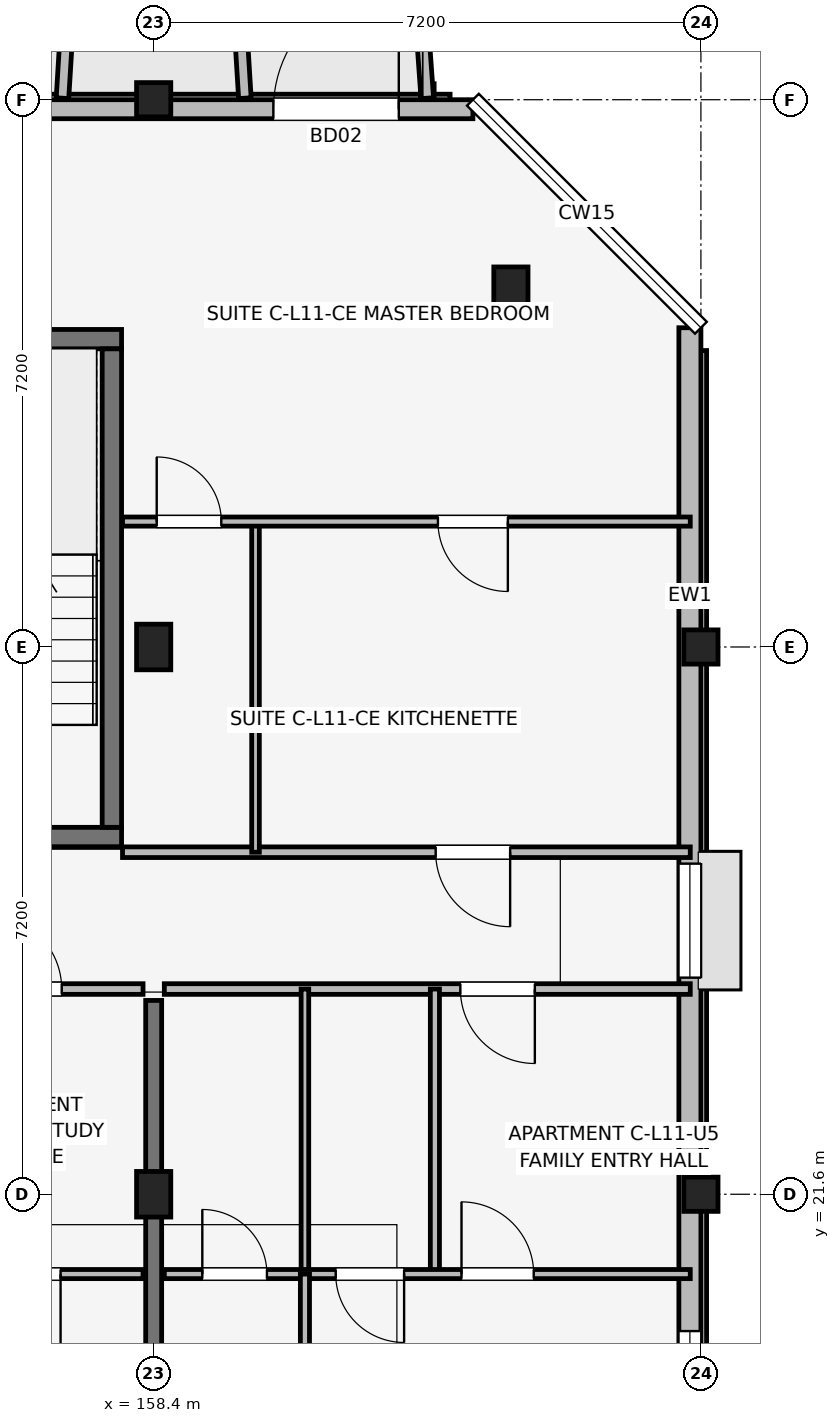
"""IFC4 building model, lengths in metres.
Left out: names, types, materials, properties, quantities, classifications, styles, units other than length and angle.
Written with IfcOpenShell. Run it as: python <this file> out.ifc"""

import sys

from ifc_helpers import new_model, si_unit, direction, frame, frame_2d, origin, origin_2d, place, context, subcontext, project, spatial, rectangle, extrude, element, fill, save


model = new_model("IFC4")
c1 = context("Model", 3, precision=1e-05, world=origin(), true_north=direction((0.0, 1.0)))
c2 = subcontext(c1, "Body", "Model", "MODEL_VIEW")
j1 = project(units=[si_unit("LENGTHUNIT", "METRE"), si_unit("PLANEANGLEUNIT", "RADIAN")], contexts=[c1])
p1 = place(None, origin())
s1 = spatial("IfcSite", under=j1, at=p1, CompositionType="ELEMENT")
p2 = place(p1, origin())
s2 = spatial("IfcBuilding", under=s1, at=p2, CompositionType="ELEMENT")
p3 = place(p2, frame((0.0, 0.0, 37.05)))
s3 = spatial("IfcBuildingStorey", under=s2, at=p3, CompositionType="ELEMENT", Elevation=37.05)
for number, where, z_axis, x_axis in (
    (1, (158.4, 21.6, 0.0), (0.0, 0.0, 1.0), (1.0, 0.0, 0.0)),
    (2, (158.4, 28.8, 0.0), (0.0, 0.0, 1.0), (1.0, 0.0, 0.0)),
):
    element("IfcColumn", number, at=place(p3, frame(where, z_axis=z_axis, x_axis=x_axis)), inside=s3, PredefinedType="COLUMN", context=c2, shape_type="SweptSolid", body=[
        extrude(rectangle(XDim=0.45, YDim=0.6, at=origin_2d()), origin(), (0.0, 0.0, 1.0), 3.15),
    ])
for number, where, z_axis, x_axis in (
    (3, (158.4, 36.0, 0.0), (0.0, 0.0, 1.0), (1.0, 0.0, 0.0)),
    (4, (165.6, 21.6, 0.0), (0.0, 0.0, 1.0), (1.0, 0.0, 0.0)),
    (5, (165.6, 28.8, 0.0), (0.0, 0.0, 1.0), (1.0, 0.0, 0.0)),
):
    element("IfcColumn", number, at=place(p3, frame(where, z_axis=z_axis, x_axis=x_axis)), inside=s3, PredefinedType="COLUMN", context=c2, shape_type="SweptSolid", body=[
        extrude(rectangle(XDim=0.45, YDim=0.45, at=origin_2d()), origin(), (0.0, 0.0, 1.0), 3.15),
    ])
p4 = place(p3, frame((163.1, 33.5, 0.0), z_axis=(0.0, 0.0, 1.0), x_axis=(1.0, 0.0, 0.0)))
e6 = element("IfcColumn", 6, at=p4, inside=s3, PredefinedType="COLUMN", context=c2, shape_type="SweptSolid", body=[
    extrude(rectangle(XDim=0.45, YDim=0.6, at=origin_2d()), origin(), (0.0, 0.0, 1.0), 3.15),
])
p5 = place(p3, frame((154.673, 26.3, 0.0), z_axis=(0.0, 0.0, 1.0), x_axis=(1.0, 0.0, 0.0)))
e7 = element("IfcWall", 7, at=p5, inside=s3, PredefinedType="SHEAR", context=c2, shape_type="SweptSolid", body=[
    extrude(rectangle(XDim=3.305, YDim=0.255, at=frame_2d((1.652, 0.0))), origin(), (0.0, 0.0, 1.0), 3.15),
])
p6 = place(p5, frame((1.127, 0.0, 0.0)))
e8 = element("IfcOpeningElement", 8, at=p6, cuts=e7, PredefinedType="OPENING", context=c2, shape_type="SweptSolid", body=[
    extrude(rectangle(XDim=1.05, YDim=2.12, at=frame_2d((0.525, 1.06))), frame((0.0, 0.137, 0.0), z_axis=(0.0, -1.0, 0.0), x_axis=(1.0, 0.0, 0.0)), (0.0, 0.0, 1.0), 0.275),
])
p7 = place(p3, frame((154.673, 32.85, 0.0), z_axis=(0.0, 0.0, 1.0), x_axis=(1.0, 0.0, 0.0)))
e9 = element("IfcWall", 9, at=p7, inside=s3, PredefinedType="SHEAR", context=c2, shape_type="SweptSolid", body=[
    extrude(rectangle(XDim=3.305, YDim=0.255, at=frame_2d((1.652, 0.0))), origin(), (0.0, 0.0, 1.0), 3.15),
])
p8 = place(p3, frame((157.85, 26.427, 0.0), z_axis=(0.0, 0.0, 1.0), x_axis=(0.0, 1.0, 0.0)))
e10 = element("IfcWall", 10, at=p8, inside=s3, PredefinedType="SHEAR", context=c2, shape_type="SweptSolid", body=[
    extrude(rectangle(XDim=6.295, YDim=0.255, at=frame_2d((3.147, 0.0))), origin(), (0.0, 0.0, 1.0), 3.15),
])
p9 = place(p3, frame((158.4, 14.75, 0.0), z_axis=(0.0, 0.0, 1.0), x_axis=(0.0, 1.0, 0.0)))
e11 = element("IfcWall", 11, at=p9, inside=s3, PredefinedType="SHEAR", context=c2, shape_type="SweptSolid", body=[
    extrude(rectangle(XDim=9.4, YDim=0.21, at=frame_2d((4.7, 0.0))), origin(), (0.0, 0.0, 1.0), 3.15),
])
p10 = place(p3, frame((165.455, 17.4, 0.0), z_axis=(0.0, 0.0, 1.0), x_axis=(0.0, 1.0, 0.0)))
e12 = element("IfcWall", 12, at=p10, inside=s3, PredefinedType="SOLIDWALL", context=c2, shape_type="SweptSolid", body=[
    extrude(rectangle(XDim=15.6, YDim=0.29, at=frame_2d((7.8, 0.0))), origin(), (0.0, 0.0, 1.0), 2.48),
])
p11 = place(p10, frame((7.05, 0.0, 1.05)))
e13 = element("IfcOpeningElement", 13, at=p11, cuts=e12, PredefinedType="OPENING", context=c2, shape_type="SweptSolid", body=[
    extrude(rectangle(XDim=1.5, YDim=1.15, at=frame_2d((0.75, 0.575))), frame((0.0, 0.155, 0.0), z_axis=(0.0, -1.0, 0.0), x_axis=(1.0, 0.0, 0.0)), (0.0, 0.0, 1.0), 0.31),
])
p12 = place(p10, frame((0.98, 0.0, 0.75)))
e14 = element("IfcOpeningElement", 14, at=p12, cuts=e12, PredefinedType="OPENING", context=c2, shape_type="SweptSolid", body=[
    extrude(rectangle(XDim=1.42, YDim=1.6, at=frame_2d((0.71, 0.8))), frame((0.0, 0.155, 0.0), z_axis=(0.0, -1.0, 0.0), x_axis=(1.0, 0.0, 0.0)), (0.0, 0.0, 1.0), 0.31),
])
p13 = place(p3, frame((162.6, 35.875, 0.0), z_axis=(0.0, 0.0, 1.0), x_axis=(-1.0, 0.0, 0.0)))
e15 = element("IfcWall", 15, at=p13, inside=s3, PredefinedType="SOLIDWALL", context=c2, shape_type="SweptSolid", body=[
    extrude(rectangle(XDim=30.0, YDim=0.25, at=frame_2d((15.0, 0.0))), origin(), (0.0, 0.0, 1.0), 2.45),
])
p14 = place(p13, frame((28.95, 0.0, 0.0), z_axis=(0.0, 0.0, 1.0), x_axis=(-1.0, 0.0, 0.0)))
e16 = element("IfcOpeningElement", 16, at=p14, cuts=e15, PredefinedType="OPENING", context=c2, shape_type="SweptSolid", body=[
    extrude(rectangle(XDim=1.5, YDim=2.15, at=frame_2d((0.75, 1.075))), frame((0.0, 0.135, 0.0), z_axis=(0.0, -1.0, 0.0), x_axis=(1.0, 0.0, 0.0)), (0.0, 0.0, 1.0), 0.27),
])
p15 = place(p13, frame((2.625, 0.0, 0.0), z_axis=(0.0, 0.0, 1.0), x_axis=(-1.0, 0.0, 0.0)))
e17 = element("IfcOpeningElement", 17, at=p15, cuts=e15, PredefinedType="OPENING", context=c2, shape_type="SweptSolid", body=[
    extrude(rectangle(XDim=1.65, YDim=2.15, at=frame_2d((0.825, 1.075))), frame((0.0, 0.135, 0.0), z_axis=(0.0, -1.0, 0.0), x_axis=(1.0, 0.0, 0.0)), (0.0, 0.0, 1.0), 0.27),
])
p16 = place(p13, frame((15.23, 0.0, 0.5)))
e18 = element("IfcOpeningElement", 18, at=p16, cuts=e15, PredefinedType="OPENING", context=c2, shape_type="SweptSolid", body=[
    extrude(rectangle(XDim=1.15, YDim=1.68, at=frame_2d((0.575, 0.84))), frame((0.0, 0.135, 0.0), z_axis=(0.0, -1.0, 0.0), x_axis=(1.0, 0.0, 0.0)), (0.0, 0.0, 1.0), 0.27),
])
p17 = place(p13, frame((8.075, 0.0, 0.69)))
e19 = element("IfcOpeningElement", 19, at=p17, cuts=e15, PredefinedType="OPENING", context=c2, shape_type="SweptSolid", body=[
    extrude(rectangle(XDim=2.0, YDim=1.65, at=frame_2d((1.0, 0.825))), frame((0.0, 0.135, 0.0), z_axis=(0.0, -1.0, 0.0), x_axis=(1.0, 0.0, 0.0)), (0.0, 0.0, 1.0), 0.27),
])
p18 = place(p13, frame((20.11, 0.0, 0.7)))
e20 = element("IfcOpeningElement", 20, at=p18, cuts=e15, PredefinedType="OPENING", context=c2, shape_type="SweptSolid", body=[
    extrude(rectangle(XDim=1.58, YDim=1.6, at=frame_2d((0.79, 0.8))), frame((0.0, 0.135, 0.0), z_axis=(0.0, -1.0, 0.0), x_axis=(1.0, 0.0, 0.0)), (0.0, 0.0, 1.0), 0.27),
])
p19 = place(p3, frame((157.2, 36.02, 0.0), z_axis=(0.0, 0.0, 1.0), x_axis=(0.061170732449, 0.998127317276, 0.0)))
e21 = element("IfcWall", 21, at=p19, inside=s3, PredefinedType="ELEMENTEDWALL", context=c2, shape_type="SweptSolid", body=[
    extrude(rectangle(XDim=1.964, YDim=0.165, at=frame_2d((0.982, 0.0))), origin(), (0.0, 0.0, 1.0), 2.53),
])
p20 = place(p3, frame((159.6, 36.02, 0.0), z_axis=(0.0, 0.0, 1.0), x_axis=(-0.061170732449, 0.998127317276, 0.0)))
e22 = element("IfcWall", 22, at=p20, inside=s3, PredefinedType="ELEMENTEDWALL", context=c2, shape_type="SweptSolid", body=[
    extrude(rectangle(XDim=1.964, YDim=0.165, at=frame_2d((0.982, 0.0))), origin(), (0.0, 0.0, 1.0), 2.95),
])
p21 = place(p3, frame((162.0, 36.02, 0.0), z_axis=(0.0, 0.0, 1.0), x_axis=(-0.071194071069, 0.997462482625, 0.0)))
e23 = element("IfcWall", 23, at=p21, inside=s3, PredefinedType="ELEMENTEDWALL", context=c2, shape_type="SweptSolid", body=[
    extrude(rectangle(XDim=1.965, YDim=0.165, at=frame_2d((0.982, 0.0))), origin(), (0.0, 0.0, 1.0), 2.95),
])
p22 = place(p3, frame((151.34, 24.3, 0.0), z_axis=(0.0, 0.0, 1.0), x_axis=(1.0, 0.0, 0.0)))
e24 = element("IfcWall", 24, at=p22, inside=s3, PredefinedType="PARTITIONING", context=c2, shape_type="SweptSolid", body=[
    extrude(rectangle(XDim=6.92, YDim=0.14, at=frame_2d((3.46, 0.0))), origin(), (0.0, 0.0, 1.0), 2.38),
])
p23 = place(p22, frame((4.87, 0.0, 0.0)))
e25 = element("IfcOpeningElement", 25, at=p23, cuts=e24, PredefinedType="OPENING", context=c2, shape_type="SweptSolid", body=[
    extrude(rectangle(XDim=0.98, YDim=2.1, at=frame_2d((0.49, 1.05))), frame((0.0, 0.08, 0.0), z_axis=(0.0, -1.0, 0.0), x_axis=(1.0, 0.0, 0.0)), (0.0, 0.0, 1.0), 0.16),
])
p24 = place(p3, frame((151.34, 20.55, 0.0), z_axis=(0.0, 0.0, 1.0), x_axis=(1.0, 0.0, 0.0)))
e26 = element("IfcWall", 26, at=p24, inside=s3, PredefinedType="PARTITIONING", context=c2, shape_type="SweptSolid", body=[
    extrude(rectangle(XDim=6.92, YDim=0.12, at=frame_2d((3.46, 0.0))), origin(), (0.0, 0.0, 1.0), 2.38),
])
p25 = place(p24, frame((1.35, 0.0, 0.0), z_axis=(0.0, 0.0, 1.0), x_axis=(-1.0, 0.0, 0.0)))
e27 = element("IfcOpeningElement", 27, at=p25, cuts=e26, PredefinedType="OPENING", context=c2, shape_type="SweptSolid", body=[
    extrude(rectangle(XDim=0.85, YDim=2.08, at=frame_2d((0.425, 1.04))), frame((0.0, 0.07, 0.0), z_axis=(0.0, -1.0, 0.0), x_axis=(1.0, 0.0, 0.0)), (0.0, 0.0, 1.0), 0.14),
])
p26 = place(p24, frame((2.375, 0.0, 0.0)))
e28 = element("IfcOpeningElement", 28, at=p26, cuts=e26, PredefinedType="OPENING", context=c2, shape_type="SweptSolid", body=[
    extrude(rectangle(XDim=0.9, YDim=2.08, at=frame_2d((0.45, 1.04))), frame((0.0, 0.07, 0.0), z_axis=(0.0, -1.0, 0.0), x_axis=(1.0, 0.0, 0.0)), (0.0, 0.0, 1.0), 0.14),
])
p27 = place(p24, frame((5.835, 0.0, 0.0), z_axis=(0.0, 0.0, 1.0), x_axis=(-1.0, 0.0, 0.0)))
e29 = element("IfcOpeningElement", 29, at=p27, cuts=e26, PredefinedType="OPENING", context=c2, shape_type="SweptSolid", body=[
    extrude(rectangle(XDim=0.95, YDim=2.08, at=frame_2d((0.475, 1.04))), frame((0.0, 0.07, 0.0), z_axis=(0.0, -1.0, 0.0), x_axis=(1.0, 0.0, 0.0)), (0.0, 0.0, 1.0), 0.14),
])
p28 = place(p3, frame((158.54, 24.3, 0.0), z_axis=(0.0, 0.0, 1.0), x_axis=(1.0, 0.0, 0.0)))
e30 = element("IfcWall", 30, at=p28, inside=s3, PredefinedType="PARTITIONING", context=c2, shape_type="SweptSolid", body=[
    extrude(rectangle(XDim=6.92, YDim=0.14, at=frame_2d((3.46, 0.0))), origin(), (0.0, 0.0, 1.0), 2.38),
])
p29 = place(p28, frame((4.875, 0.0, 0.0), z_axis=(0.0, 0.0, 1.0), x_axis=(-1.0, 0.0, 0.0)))
e31 = element("IfcOpeningElement", 31, at=p29, cuts=e30, PredefinedType="OPENING", context=c2, shape_type="SweptSolid", body=[
    extrude(rectangle(XDim=0.98, YDim=2.1, at=frame_2d((0.49, 1.05))), frame((0.0, 0.08, 0.0), z_axis=(0.0, -1.0, 0.0), x_axis=(1.0, 0.0, 0.0)), (0.0, 0.0, 1.0), 0.16),
])
p30 = place(p3, frame((160.39, 20.55, 0.0), z_axis=(0.0, 0.0, 1.0), x_axis=(0.0, 1.0, 0.0)))
e32 = element("IfcWall", 32, at=p30, inside=s3, PredefinedType="PARTITIONING", context=c2, shape_type="SweptSolid", body=[
    extrude(rectangle(XDim=3.75, YDim=0.1, at=frame_2d((1.875, 0.0))), origin(), (0.0, 0.0, 1.0), 2.38),
])
p31 = place(p3, frame((162.1, 20.55, 0.0), z_axis=(0.0, 0.0, 1.0), x_axis=(0.0, 1.0, 0.0)))
e33 = element("IfcWall", 33, at=p31, inside=s3, PredefinedType="PARTITIONING", context=c2, shape_type="SweptSolid", body=[
    extrude(rectangle(XDim=3.75, YDim=0.12, at=frame_2d((1.875, 0.0))), origin(), (0.0, 0.0, 1.0), 2.38),
])
p32 = place(p3, frame((158.54, 20.55, 0.0), z_axis=(0.0, 0.0, 1.0), x_axis=(1.0, 0.0, 0.0)))
e34 = element("IfcWall", 34, at=p32, inside=s3, PredefinedType="PARTITIONING", context=c2, shape_type="SweptSolid", body=[
    extrude(rectangle(XDim=6.92, YDim=0.12, at=frame_2d((3.46, 0.0))), origin(), (0.0, 0.0, 1.0), 2.38),
])
p33 = place(p32, frame((0.5, 0.0, 0.0)))
e35 = element("IfcOpeningElement", 35, at=p33, cuts=e34, PredefinedType="OPENING", context=c2, shape_type="SweptSolid", body=[
    extrude(rectangle(XDim=0.85, YDim=2.08, at=frame_2d((0.425, 1.04))), frame((0.0, 0.07, 0.0), z_axis=(0.0, -1.0, 0.0), x_axis=(1.0, 0.0, 0.0)), (0.0, 0.0, 1.0), 0.14),
])
p34 = place(p32, frame((3.155, 0.0, 0.0), z_axis=(0.0, 0.0, 1.0), x_axis=(-1.0, 0.0, 0.0)))
e36 = element("IfcOpeningElement", 36, at=p34, cuts=e34, PredefinedType="OPENING", context=c2, shape_type="SweptSolid", body=[
    extrude(rectangle(XDim=0.9, YDim=2.08, at=frame_2d((0.45, 1.04))), frame((0.0, 0.07, 0.0), z_axis=(0.0, -1.0, 0.0), x_axis=(1.0, 0.0, 0.0)), (0.0, 0.0, 1.0), 0.14),
])
p35 = place(p32, frame((3.91, 0.0, 0.0)))
e37 = element("IfcOpeningElement", 37, at=p35, cuts=e34, PredefinedType="OPENING", context=c2, shape_type="SweptSolid", body=[
    extrude(rectangle(XDim=0.95, YDim=2.08, at=frame_2d((0.475, 1.04))), frame((0.0, 0.07, 0.0), z_axis=(0.0, -1.0, 0.0), x_axis=(1.0, 0.0, 0.0)), (0.0, 0.0, 1.0), 0.14),
])
p36 = place(p3, frame((160.39, 14.7, 0.0), z_axis=(0.0, 0.0, 1.0), x_axis=(0.0, 1.0, 0.0)))
e38 = element("IfcWall", 38, at=p36, inside=s3, PredefinedType="PARTITIONING", context=c2, shape_type="SweptSolid", body=[
    extrude(rectangle(XDim=5.85, YDim=0.12, at=frame_2d((2.925, 0.0))), origin(), (0.0, 0.0, 1.0), 2.38),
])
p37 = place(p36, frame((2.475, 0.0, 0.0)))
e39 = element("IfcOpeningElement", 39, at=p37, cuts=e38, PredefinedType="OPENING", context=c2, shape_type="SweptSolid", body=[
    extrude(rectangle(XDim=0.9, YDim=2.08, at=frame_2d((0.45, 1.04))), frame((0.0, 0.07, 0.0), z_axis=(0.0, -1.0, 0.0), x_axis=(1.0, 0.0, 0.0)), (0.0, 0.0, 1.0), 0.14),
])
p38 = place(p3, frame((157.99, 26.1, 0.0), z_axis=(0.0, 0.0, 1.0), x_axis=(1.0, 0.0, 0.0)))
e40 = element("IfcWall", 40, at=p38, inside=s3, PredefinedType="PARTITIONING", context=c2, shape_type="SweptSolid", body=[
    extrude(rectangle(XDim=7.47, YDim=0.14, at=frame_2d((3.735, 0.0))), origin(), (0.0, 0.0, 1.0), 2.38),
])
p39 = place(p38, frame((5.1, 0.0, 0.0), z_axis=(0.0, 0.0, 1.0), x_axis=(-1.0, 0.0, 0.0)))
e41 = element("IfcOpeningElement", 41, at=p39, cuts=e40, PredefinedType="OPENING", context=c2, shape_type="SweptSolid", body=[
    extrude(rectangle(XDim=0.98, YDim=2.1, at=frame_2d((0.49, 1.05))), frame((0.0, 0.08, 0.0), z_axis=(0.0, -1.0, 0.0), x_axis=(1.0, 0.0, 0.0)), (0.0, 0.0, 1.0), 0.16),
])
p40 = place(p3, frame((159.74, 26.1, 0.0), z_axis=(0.0, 0.0, 1.0), x_axis=(0.0, 1.0, 0.0)))
e42 = element("IfcWall", 42, at=p40, inside=s3, PredefinedType="PARTITIONING", context=c2, shape_type="SweptSolid", body=[
    extrude(rectangle(XDim=4.35, YDim=0.1, at=frame_2d((2.175, 0.0))), origin(), (0.0, 0.0, 1.0), 2.38),
])
p41 = place(p3, frame((157.99, 30.45, 0.0), z_axis=(0.0, 0.0, 1.0), x_axis=(1.0, 0.0, 0.0)))
e43 = element("IfcWall", 43, at=p41, inside=s3, PredefinedType="PARTITIONING", context=c2, shape_type="SweptSolid", body=[
    extrude(rectangle(XDim=7.47, YDim=0.12, at=frame_2d((3.735, 0.0))), origin(), (0.0, 0.0, 1.0), 2.38),
])
p42 = place(p41, frame((0.45, 0.0, 0.0)))
e44 = element("IfcOpeningElement", 44, at=p42, cuts=e43, PredefinedType="OPENING", context=c2, shape_type="SweptSolid", body=[
    extrude(rectangle(XDim=0.85, YDim=2.08, at=frame_2d((0.425, 1.04))), frame((0.0, 0.07, 0.0), z_axis=(0.0, -1.0, 0.0), x_axis=(1.0, 0.0, 0.0)), (0.0, 0.0, 1.0), 0.14),
])
p43 = place(p41, frame((5.07, 0.0, 0.0), z_axis=(0.0, 0.0, 1.0), x_axis=(-1.0, 0.0, 0.0)))
e45 = element("IfcOpeningElement", 45, at=p43, cuts=e43, PredefinedType="OPENING", context=c2, shape_type="SweptSolid", body=[
    extrude(rectangle(XDim=0.92, YDim=2.08, at=frame_2d((0.46, 1.04))), frame((0.0, 0.07, 0.0), z_axis=(0.0, -1.0, 0.0), x_axis=(1.0, 0.0, 0.0)), (0.0, 0.0, 1.0), 0.14),
])
p44 = place(p15, origin())
e46 = element("IfcDoor", 46, at=p44, inside=s3, OperationType="SINGLE_SWING_LEFT", PredefinedType="DOOR", context=c2, shape_type="SweptSolid", body=[
    extrude(rectangle(XDim=1.65, YDim=2.15, at=frame_2d((0.825, 1.075))), frame((0.0, 0.025, 0.0), z_axis=(0.0, -1.0, 0.0), x_axis=(1.0, 0.0, 0.0)), (0.0, 0.0, 1.0), 0.05),
])
fill(e17, e46)
p45 = place(p11, origin())
e47 = element("IfcWindow", 47, at=p45, inside=s3, PartitioningType="SINGLE_PANEL", PredefinedType="WINDOW", context=c2, shape_type="SweptSolid", body=[
    extrude(rectangle(XDim=1.5, YDim=1.15, at=frame_2d((0.75, 0.575))), frame((0.0, 0.03, 0.0), z_axis=(0.0, -1.0, 0.0), x_axis=(1.0, 0.0, 0.0)), (0.0, 0.0, 1.0), 0.06),
])
fill(e13, e47)
p46 = place(p12, origin())
e48 = element("IfcWindow", 48, at=p46, inside=s3, PartitioningType="SINGLE_PANEL", PredefinedType="WINDOW", context=c2, shape_type="SweptSolid", body=[
    extrude(rectangle(XDim=1.42, YDim=1.6, at=frame_2d((0.71, 0.8))), frame((0.0, 0.03, 0.0), z_axis=(0.0, -1.0, 0.0), x_axis=(1.0, 0.0, 0.0)), (0.0, 0.0, 1.0), 0.06),
])
fill(e14, e48)
p47 = place(p23, origin())
e49 = element("IfcDoor", 49, at=p47, inside=s3, OperationType="SINGLE_SWING_LEFT", PredefinedType="DOOR", context=c2, shape_type="SweptSolid", body=[
    extrude(rectangle(XDim=0.98, YDim=2.1, at=frame_2d((0.49, 1.05))), frame((0.0, 0.025, 0.0), z_axis=(0.0, -1.0, 0.0), x_axis=(1.0, 0.0, 0.0)), (0.0, 0.0, 1.0), 0.05),
])
fill(e25, e49)
p48 = place(p27, origin())
e50 = element("IfcDoor", 50, at=p48, inside=s3, OperationType="SINGLE_SWING_RIGHT", PredefinedType="DOOR", context=c2, shape_type="SweptSolid", body=[
    extrude(rectangle(XDim=0.95, YDim=2.08, at=frame_2d((0.475, 1.04))), frame((0.0, 0.025, 0.0), z_axis=(0.0, -1.0, 0.0), x_axis=(1.0, 0.0, 0.0)), (0.0, 0.0, 1.0), 0.05),
])
fill(e29, e50)
p49 = place(p29, origin())
e51 = element("IfcDoor", 51, at=p49, inside=s3, OperationType="SINGLE_SWING_RIGHT", PredefinedType="DOOR", context=c2, shape_type="SweptSolid", body=[
    extrude(rectangle(XDim=0.98, YDim=2.1, at=frame_2d((0.49, 1.05))), frame((0.0, 0.025, 0.0), z_axis=(0.0, -1.0, 0.0), x_axis=(1.0, 0.0, 0.0)), (0.0, 0.0, 1.0), 0.05),
])
fill(e31, e51)
p50 = place(p33, origin())
e52 = element("IfcDoor", 52, at=p50, inside=s3, OperationType="SINGLE_SWING_LEFT", PredefinedType="DOOR", context=c2, shape_type="SweptSolid", body=[
    extrude(rectangle(XDim=0.85, YDim=2.08, at=frame_2d((0.425, 1.04))), frame((0.0, 0.025, 0.0), z_axis=(0.0, -1.0, 0.0), x_axis=(1.0, 0.0, 0.0)), (0.0, 0.0, 1.0), 0.05),
])
fill(e35, e52)
p51 = place(p34, origin())
e53 = element("IfcDoor", 53, at=p51, inside=s3, OperationType="SINGLE_SWING_RIGHT", PredefinedType="DOOR", context=c2, shape_type="SweptSolid", body=[
    extrude(rectangle(XDim=0.9, YDim=2.08, at=frame_2d((0.45, 1.04))), frame((0.0, 0.025, 0.0), z_axis=(0.0, -1.0, 0.0), x_axis=(1.0, 0.0, 0.0)), (0.0, 0.0, 1.0), 0.05),
])
fill(e36, e53)
p52 = place(p35, origin())
e54 = element("IfcDoor", 54, at=p52, inside=s3, OperationType="SINGLE_SWING_LEFT", PredefinedType="DOOR", context=c2, shape_type="SweptSolid", body=[
    extrude(rectangle(XDim=0.95, YDim=2.08, at=frame_2d((0.475, 1.04))), frame((0.0, 0.025, 0.0), z_axis=(0.0, -1.0, 0.0), x_axis=(1.0, 0.0, 0.0)), (0.0, 0.0, 1.0), 0.05),
])
fill(e37, e54)
p53 = place(p39, origin())
e55 = element("IfcDoor", 55, at=p53, inside=s3, OperationType="SINGLE_SWING_RIGHT", PredefinedType="DOOR", context=c2, shape_type="SweptSolid", body=[
    extrude(rectangle(XDim=0.98, YDim=2.1, at=frame_2d((0.49, 1.05))), frame((0.0, 0.025, 0.0), z_axis=(0.0, -1.0, 0.0), x_axis=(1.0, 0.0, 0.0)), (0.0, 0.0, 1.0), 0.05),
])
fill(e41, e55)
p54 = place(p42, origin())
e56 = element("IfcDoor", 56, at=p54, inside=s3, OperationType="SINGLE_SWING_LEFT", PredefinedType="DOOR", context=c2, shape_type="SweptSolid", body=[
    extrude(rectangle(XDim=0.85, YDim=2.08, at=frame_2d((0.425, 1.04))), frame((0.0, 0.025, 0.0), z_axis=(0.0, -1.0, 0.0), x_axis=(1.0, 0.0, 0.0)), (0.0, 0.0, 1.0), 0.05),
])
fill(e44, e56)
p55 = place(p43, origin())
e57 = element("IfcDoor", 57, at=p55, inside=s3, OperationType="SINGLE_SWING_RIGHT", PredefinedType="DOOR", context=c2, shape_type="SweptSolid", body=[
    extrude(rectangle(XDim=0.92, YDim=2.08, at=frame_2d((0.46, 1.04))), frame((0.0, 0.025, 0.0), z_axis=(0.0, -1.0, 0.0), x_axis=(1.0, 0.0, 0.0)), (0.0, 0.0, 1.0), 0.05),
])
fill(e45, e57)
save(model, sys.argv[1])
